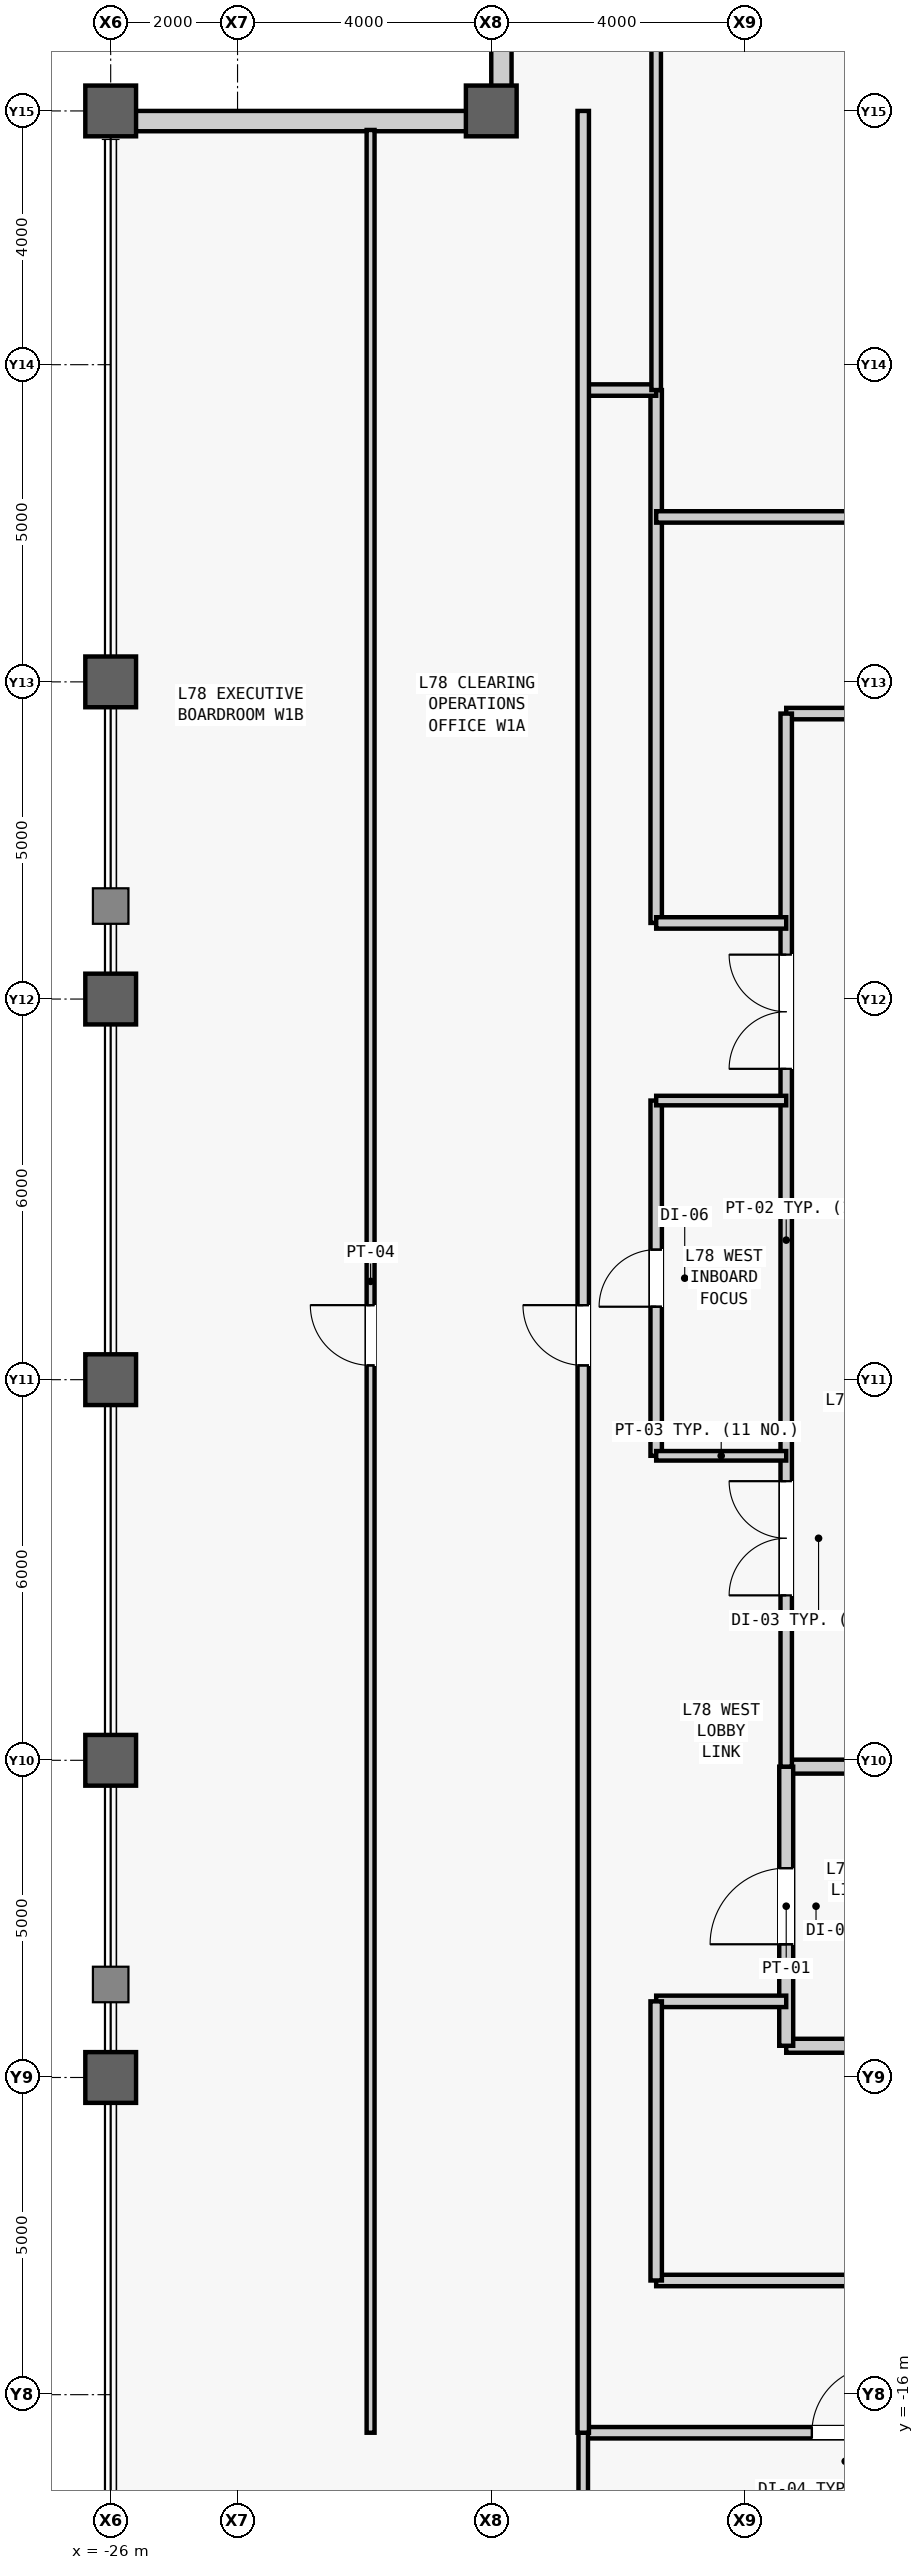
"""IFC4 building model, lengths in metres.
Left out: names, types, materials, properties, quantities, classifications, styles, units other than length and angle.
Written with IfcOpenShell. Run it as: python <this file> out.ifc"""

import sys

from ifc_helpers import new_model, si_unit, direction, frame, frame_2d, origin, origin_2d, place, context, subcontext, project, spatial, rectangle, hollow_rectangle, extrude, source, transform, mapped, element, fill, save


model = new_model("IFC4")
c1 = context("Model", 3, precision=1e-05, world=origin(), true_north=direction((0.0, 1.0)))
c2 = subcontext(c1, "Body", "Model", "MODEL_VIEW")
j1 = project(units=[si_unit("LENGTHUNIT", "METRE"), si_unit("PLANEANGLEUNIT", "RADIAN")], contexts=[c1])
p1 = place(None, origin())
s1 = spatial("IfcSite", under=j1, at=p1, CompositionType="ELEMENT")
p2 = place(p1, origin())
s2 = spatial("IfcBuilding", under=s1, at=p2, CompositionType="ELEMENT")
p3 = place(p2, frame((0.0, 0.0, 330.3)))
s3 = spatial("IfcBuildingStorey", under=s2, at=p3, CompositionType="ELEMENT", Elevation=330.3)
m1 = source(origin(), c2, "Body", "SweptSolid", [
    extrude(hollow_rectangle(XDim=0.8, YDim=0.8, WallThickness=0.045, at=origin_2d()), origin(), (0.0, 0.0, 1.0), 4.0),
])
for number, where, z_axis, x_axis in (
    (1, (-26.0, -11.0, 0.0), (0.0, 0.0, 1.0), (1.0, 0.0, 0.0)),
    (2, (-26.0, -6.0, 0.0), (0.0, 0.0, 1.0), (1.0, 0.0, 0.0)),
    (3, (-26.0, 0.0, 0.0), (0.0, 0.0, 1.0), (1.0, 0.0, 0.0)),
    (4, (-26.0, 6.0, 0.0), (0.0, 0.0, 1.0), (1.0, 0.0, 0.0)),
    (5, (-26.0, 11.0, 0.0), (0.0, 0.0, 1.0), (1.0, 0.0, 0.0)),
    (6, (-26.0, 20.0, 0.0), (0.0, 0.0, 1.0), (1.0, 0.0, 0.0)),
    (7, (-20.0, 20.0, 0.0), (0.0, 0.0, 1.0), (1.0, 0.0, 0.0)),
):
    element("IfcColumn", number, at=place(p3, frame(where, z_axis=z_axis, x_axis=x_axis)), inside=s3, PredefinedType="COLUMN", context=c2, shape_type="MappedRepresentation", body=[
        mapped(m1, transform((0.0, 0.0, 0.0), scale=1.0)),
    ])
m2 = source(origin(), c2, "Body", "SweptSolid", [
    extrude(rectangle(XDim=5.68, YDim=0.32, at=frame_2d((2.84, 0.0))), origin(), (0.0, 0.0, 1.0), 3.191),
])
p4 = place(p3, frame((-19.84, 20.0, 0.0), z_axis=(0.0, 0.0, 1.0), x_axis=(0.0, 1.0, 0.0)))
e8 = element("IfcWall", 8, at=p4, inside=s3, PredefinedType="STANDARD", context=c2, shape_type="MappedRepresentation", body=[
    mapped(m2, transform((0.0, 0.0, 0.0), scale=1.0)),
])
m3 = source(origin(), c2, "Body", "SweptSolid", [
    extrude(rectangle(XDim=1.8, YDim=2.4, at=frame_2d((0.9, 1.2))), frame((0.0, 0.17, 0.0), z_axis=(0.0, -1.0, 0.0), x_axis=(1.0, 0.0, 0.0)), (0.0, 0.0, 1.0), 0.34),
])
p5 = place(p4, frame((1.94, 0.0, 0.5)))
e9 = element("IfcOpeningElement", 9, at=p5, cuts=e8, PredefinedType="OPENING", context=c2, shape_type="MappedRepresentation", body=[
    mapped(m3, transform((0.0, 0.0, 0.0), scale=1.0)),
])
p6 = place(p3, frame((-20.0, 19.84, 0.0), z_axis=(0.0, 0.0, 1.0), x_axis=(-1.0, 0.0, 0.0)))
e10 = element("IfcWall", 10, at=p6, inside=s3, PredefinedType="STANDARD", context=c2, shape_type="MappedRepresentation", body=[
    mapped(m2, transform((0.0, 0.0, 0.0), scale=1.0)),
])
m4 = source(origin(), c2, "Body", "SweptSolid", [
    extrude(rectangle(XDim=4.05, YDim=0.22, at=frame_2d((2.025, 0.0))), origin(), (0.0, 0.0, 1.0), 3.74),
])
p7 = place(p3, frame((-15.35, -10.5, 0.0), z_axis=(0.0, 0.0, 1.0), x_axis=(1.0, 0.0, 0.0)))
e11 = element("IfcWall", 11, at=p7, inside=s3, PredefinedType="PARTITIONING", context=c2, shape_type="MappedRepresentation", body=[
    mapped(m4, transform((0.0, 0.0, 0.0), scale=1.0)),
])
m5 = source(origin(), c2, "Body", "SweptSolid", [
    extrude(rectangle(XDim=4.05, YDim=0.22, at=frame_2d((2.025, 0.0))), origin(), (0.0, 0.0, 1.0), 3.124),
])
p8 = place(p3, frame((-15.35, -6.1, 0.0), z_axis=(0.0, 0.0, 1.0), x_axis=(1.0, 0.0, 0.0)))
e12 = element("IfcWall", 12, at=p8, inside=s3, PredefinedType="PARTITIONING", context=c2, shape_type="MappedRepresentation", body=[
    mapped(m5, transform((0.0, 0.0, 0.0), scale=1.0)),
])
m6 = source(origin(), c2, "Body", "SweptSolid", [
    extrude(rectangle(XDim=4.4, YDim=0.22, at=frame_2d((2.2, 0.0))), origin(), (0.0, 0.0, 1.0), 3.74),
])
p9 = place(p3, frame((-15.35, -10.5, 0.0), z_axis=(0.0, 0.0, 1.0), x_axis=(0.0, 1.0, 0.0)))
e13 = element("IfcWall", 13, at=p9, inside=s3, PredefinedType="PARTITIONING", context=c2, shape_type="MappedRepresentation", body=[
    mapped(m6, transform((0.0, 0.0, 0.0), scale=1.0)),
])
m7 = source(origin(), c2, "Body", "SweptSolid", [
    extrude(rectangle(XDim=1.2, YDim=2.2, at=frame_2d((0.6, 1.1))), frame((0.0, 0.12, 0.0), z_axis=(0.0, -1.0, 0.0), x_axis=(1.0, 0.0, 0.0)), (0.0, 0.0, 1.0), 0.24),
])
p10 = place(p9, frame((1.6, 0.0, 0.0)))
e14 = element("IfcOpeningElement", 14, at=p10, cuts=e13, PredefinedType="OPENING", context=c2, shape_type="MappedRepresentation", body=[
    mapped(m7, transform((0.0, 0.0, 0.0), scale=1.0)),
])
m8 = source(origin(), c2, "Body", "SweptSolid", [
    extrude(rectangle(XDim=4.05, YDim=0.18, at=frame_2d((2.025, 0.0))), origin(), (0.0, 0.0, 1.0), 3.74),
])
p11 = place(p3, frame((-15.35, 10.5, 0.0), z_axis=(0.0, 0.0, 1.0), x_axis=(1.0, 0.0, 0.0)))
e15 = element("IfcWall", 15, at=p11, inside=s3, PredefinedType="PARTITIONING", context=c2, shape_type="MappedRepresentation", body=[
    mapped(m8, transform((0.0, 0.0, 0.0), scale=1.0)),
])
m9 = source(origin(), c2, "Body", "SweptSolid", [
    extrude(rectangle(XDim=16.6, YDim=0.18, at=frame_2d((8.3, 0.0))), origin(), (0.0, 0.0, 1.0), 3.74),
])
p12 = place(p3, frame((-15.35, -6.1, 0.0), z_axis=(0.0, 0.0, 1.0), x_axis=(0.0, 1.0, 0.0)))
e16 = element("IfcWall", 16, at=p12, inside=s3, PredefinedType="PARTITIONING", context=c2, shape_type="MappedRepresentation", body=[
    mapped(m9, transform((0.0, 0.0, 0.0), scale=1.0)),
])
m10 = source(origin(), c2, "Body", "SweptSolid", [
    extrude(rectangle(XDim=1.8, YDim=2.25, at=frame_2d((0.9, 1.125))), frame((0.0, 0.1, 0.0), z_axis=(0.0, -1.0, 0.0), x_axis=(1.0, 0.0, 0.0)), (0.0, 0.0, 1.0), 0.2),
])
p13 = place(p12, frame((2.7, 0.0, 0.0)))
e17 = element("IfcOpeningElement", 17, at=p13, cuts=e16, PredefinedType="OPENING", context=c2, shape_type="MappedRepresentation", body=[
    mapped(m10, transform((0.0, 0.0, 0.0), scale=1.0)),
])
p14 = place(p12, frame((11.0, 0.0, 0.0)))
e18 = element("IfcOpeningElement", 18, at=p14, cuts=e16, PredefinedType="OPENING", context=c2, shape_type="MappedRepresentation", body=[
    mapped(m10, transform((0.0, 0.0, 0.0), scale=1.0)),
])
m11 = source(origin(), c2, "Body", "SweptSolid", [
    extrude(rectangle(XDim=5.6, YDim=0.18, at=frame_2d((2.8, 0.0))), origin(), (0.0, 0.0, 1.0), 3.74),
])
p15 = place(p3, frame((-17.4, -1.2, 0.0), z_axis=(0.0, 0.0, 1.0), x_axis=(0.0, 1.0, 0.0)))
e19 = element("IfcWall", 19, at=p15, inside=s3, PredefinedType="PARTITIONING", context=c2, shape_type="MappedRepresentation", body=[
    mapped(m11, transform((0.0, 0.0, 0.0), scale=1.0)),
])
m12 = source(origin(), c2, "Body", "SweptSolid", [
    extrude(rectangle(XDim=0.9, YDim=2.15, at=frame_2d((0.45, 1.075))), frame((0.0, 0.1, 0.0), z_axis=(0.0, -1.0, 0.0), x_axis=(1.0, 0.0, 0.0)), (0.0, 0.0, 1.0), 0.2),
])
p16 = place(p15, frame((2.35, 0.0, 0.0)))
e20 = element("IfcOpeningElement", 20, at=p16, cuts=e19, PredefinedType="OPENING", context=c2, shape_type="MappedRepresentation", body=[
    mapped(m12, transform((0.0, 0.0, 0.0), scale=1.0)),
])
m13 = source(origin(), c2, "Body", "SweptSolid", [
    extrude(rectangle(XDim=2.05, YDim=0.15, at=frame_2d((1.025, 0.0))), origin(), (0.0, 0.0, 1.0), 3.74),
])
for number, where, z_axis, x_axis in (
    (21, (-17.4, -1.2, 0.0), (0.0, 0.0, 1.0), (1.0, 0.0, 0.0)),
    (22, (-17.4, 4.4, 0.0), (0.0, 0.0, 1.0), (1.0, 0.0, 0.0)),
):
    element("IfcWall", number, at=place(p3, frame(where, z_axis=z_axis, x_axis=x_axis)), inside=s3, PredefinedType="PARTITIONING", context=c2, shape_type="MappedRepresentation", body=[
        mapped(m13, transform((0.0, 0.0, 0.0), scale=1.0)),
    ])
m14 = source(origin(), c2, "Body", "SweptSolid", [
    extrude(rectangle(XDim=2.05, YDim=0.18, at=frame_2d((1.025, 0.0))), origin(), (0.0, 0.0, 1.0), 3.74),
])
p17 = place(p3, frame((-17.4, -9.8, 0.0), z_axis=(0.0, 0.0, 1.0), x_axis=(1.0, 0.0, 0.0)))
e23 = element("IfcWall", 23, at=p17, inside=s3, PredefinedType="PARTITIONING", context=c2, shape_type="MappedRepresentation", body=[
    mapped(m14, transform((0.0, 0.0, 0.0), scale=1.0)),
])
m15 = source(origin(), c2, "Body", "SweptSolid", [
    extrude(rectangle(XDim=8.4, YDim=0.18, at=frame_2d((4.2, 0.0))), origin(), (0.0, 0.0, 1.0), 3.74),
])
p18 = place(p3, frame((-17.4, 7.2, 0.0), z_axis=(0.0, 0.0, 1.0), x_axis=(0.0, 1.0, 0.0)))
e24 = element("IfcWall", 24, at=p18, inside=s3, PredefinedType="PARTITIONING", context=c2, shape_type="MappedRepresentation", body=[
    mapped(m15, transform((0.0, 0.0, 0.0), scale=1.0)),
])
p19 = place(p3, frame((-17.4, 7.2, 0.0), z_axis=(0.0, 0.0, 1.0), x_axis=(1.0, 0.0, 0.0)))
e25 = element("IfcWall", 25, at=p19, inside=s3, PredefinedType="PARTITIONING", context=c2, shape_type="MappedRepresentation", body=[
    mapped(m14, transform((0.0, 0.0, 0.0), scale=1.0)),
])
m16 = source(origin(), c2, "Body", "SweptSolid", [
    extrude(rectangle(XDim=16.1, YDim=0.18, at=frame_2d((8.05, 0.0))), origin(), (0.0, 0.0, 1.0), 3.74),
])
p20 = place(p3, frame((-17.4, -14.2, 0.0), z_axis=(0.0, 0.0, 1.0), x_axis=(1.0, 0.0, 0.0)))
e26 = element("IfcWall", 26, at=p20, inside=s3, PredefinedType="PARTITIONING", context=c2, shape_type="MappedRepresentation", body=[
    mapped(m16, transform((0.0, 0.0, 0.0), scale=1.0)),
])
p21 = place(p20, frame((8.95, 0.0, 0.0)))
e27 = element("IfcOpeningElement", 27, at=p21, cuts=e26, PredefinedType="OPENING", context=c2, shape_type="MappedRepresentation", body=[
    mapped(m12, transform((0.0, 0.0, 0.0), scale=1.0)),
])
m17 = source(origin(), c2, "Body", "SweptSolid", [
    extrude(rectangle(XDim=4.4, YDim=0.18, at=frame_2d((2.2, 0.0))), origin(), (0.0, 0.0, 1.0), 3.74),
])
p22 = place(p3, frame((-17.4, -14.2, 0.0), z_axis=(0.0, 0.0, 1.0), x_axis=(0.0, 1.0, 0.0)))
e28 = element("IfcWall", 28, at=p22, inside=s3, PredefinedType="PARTITIONING", context=c2, shape_type="MappedRepresentation", body=[
    mapped(m17, transform((0.0, 0.0, 0.0), scale=1.0)),
])
m18 = source(origin(), c2, "Body", "SweptSolid", [
    extrude(rectangle(XDim=1.15, YDim=0.18, at=frame_2d((0.575, 0.0))), origin(), (0.0, 0.0, 1.0), 3.74),
])
p23 = place(p3, frame((-18.55, 15.6, 0.0), z_axis=(0.0, 0.0, 1.0), x_axis=(1.0, 0.0, 0.0)))
e29 = element("IfcWall", 29, at=p23, inside=s3, PredefinedType="PARTITIONING", context=c2, shape_type="MappedRepresentation", body=[
    mapped(m18, transform((0.0, 0.0, 0.0), scale=1.0)),
])
m19 = source(origin(), c2, "Body", "SweptSolid", [
    extrude(rectangle(XDim=36.3, YDim=0.18, at=frame_2d((18.15, 0.0))), origin(), (0.0, 0.0, 1.0), 3.74),
])
p24 = place(p3, frame((-18.55, -16.6, 0.0), z_axis=(0.0, 0.0, 1.0), x_axis=(1.0, 0.0, 0.0)))
e30 = element("IfcWall", 30, at=p24, inside=s3, PredefinedType="PARTITIONING", context=c2, shape_type="MappedRepresentation", body=[
    mapped(m19, transform((0.0, 0.0, 0.0), scale=1.0)),
])
m20 = source(origin(), c2, "Body", "SweptSolid", [
    extrude(rectangle(XDim=1.05, YDim=2.2, at=frame_2d((0.525, 1.1))), frame((0.0, 0.1, 0.0), z_axis=(0.0, -1.0, 0.0), x_axis=(1.0, 0.0, 0.0)), (0.0, 0.0, 1.0), 0.2),
])
p25 = place(p24, frame((3.605, 0.0, 0.0)))
e31 = element("IfcOpeningElement", 31, at=p25, cuts=e30, PredefinedType="OPENING", context=c2, shape_type="MappedRepresentation", body=[
    mapped(m20, transform((0.0, 0.0, 0.0), scale=1.0)),
])
p26 = place(p24, frame((11.454, 0.0, 0.0)))
e32 = element("IfcOpeningElement", 32, at=p26, cuts=e30, PredefinedType="OPENING", context=c2, shape_type="MappedRepresentation", body=[
    mapped(m20, transform((0.0, 0.0, 0.0), scale=1.0)),
])
p27 = place(p24, frame((21.255, 0.0, 0.0)))
e33 = element("IfcOpeningElement", 33, at=p27, cuts=e30, PredefinedType="OPENING", context=c2, shape_type="MappedRepresentation", body=[
    mapped(m20, transform((0.0, 0.0, 0.0), scale=1.0)),
])
p28 = place(p24, frame((30.531, 0.0, 0.0)))
e34 = element("IfcOpeningElement", 34, at=p28, cuts=e30, PredefinedType="OPENING", context=c2, shape_type="MappedRepresentation", body=[
    mapped(m20, transform((0.0, 0.0, 0.0), scale=1.0)),
])
m21 = source(origin(), c2, "Body", "SweptSolid", [
    extrude(rectangle(XDim=9.4, YDim=0.15, at=frame_2d((4.7, 0.0))), origin(), (0.0, 0.0, 1.0), 3.74),
])
p29 = place(p3, frame((-18.55, -26.0, 0.0), z_axis=(0.0, 0.0, 1.0), x_axis=(0.0, 1.0, 0.0)))
e35 = element("IfcWall", 35, at=p29, inside=s3, PredefinedType="PARTITIONING", context=c2, shape_type="MappedRepresentation", body=[
    mapped(m21, transform((0.0, 0.0, 0.0), scale=1.0)),
])
m22 = source(origin(), c2, "Body", "SweptSolid", [
    extrude(rectangle(XDim=32.75, YDim=0.18, at=frame_2d((16.375, 0.0))), origin(), (0.0, 0.0, 1.0), 3.74),
])
p30 = place(p3, frame((-17.4, 13.6, 0.0), z_axis=(0.0, 0.0, 1.0), x_axis=(1.0, 0.0, 0.0)))
e36 = element("IfcWall", 36, at=p30, inside=s3, PredefinedType="PARTITIONING", context=c2, shape_type="MappedRepresentation", body=[
    mapped(m22, transform((0.0, 0.0, 0.0), scale=1.0)),
])
p31 = place(p30, frame((27.075, 0.0, 0.0)))
e37 = element("IfcOpeningElement", 37, at=p31, cuts=e36, PredefinedType="OPENING", context=c2, shape_type="MappedRepresentation", body=[
    mapped(m20, transform((0.0, 0.0, 0.0), scale=1.0)),
])
m23 = source(origin(), c2, "Body", "SweptSolid", [
    extrude(rectangle(XDim=10.4, YDim=0.15, at=frame_2d((5.2, 0.0))), origin(), (0.0, 0.0, 1.0), 3.74),
])
p32 = place(p3, frame((-17.4, 15.6, 0.0), z_axis=(0.0, 0.0, 1.0), x_axis=(0.0, 1.0, 0.0)))
e38 = element("IfcWall", 38, at=p32, inside=s3, PredefinedType="PARTITIONING", context=c2, shape_type="MappedRepresentation", body=[
    mapped(m23, transform((0.0, 0.0, 0.0), scale=1.0)),
])
m24 = source(origin(), c2, "Body", "SweptSolid", [
    extrude(rectangle(XDim=36.3, YDim=0.125, at=frame_2d((18.15, 0.0))), origin(), (0.0, 0.0, 1.0), 3.74),
])
p33 = place(p3, frame((-21.903, -16.6, 0.0), z_axis=(0.0, 0.0, 1.0), x_axis=(0.0, 1.0, 0.0)))
e39 = element("IfcWall", 39, at=p33, inside=s3, PredefinedType="PARTITIONING", context=c2, shape_type="MappedRepresentation", body=[
    mapped(m24, transform((0.0, 0.0, 0.0), scale=1.0)),
])
m25 = source(origin(), c2, "Body", "SweptSolid", [
    extrude(rectangle(XDim=0.95, YDim=2.15, at=frame_2d((0.475, 1.075))), frame((0.0, 0.073, 0.0), z_axis=(0.0, -1.0, 0.0), x_axis=(1.0, 0.0, 0.0)), (0.0, 0.0, 1.0), 0.145),
])
p34 = place(p33, frame((16.825, 0.0, 0.0)))
e40 = element("IfcOpeningElement", 40, at=p34, cuts=e39, PredefinedType="OPENING", context=c2, shape_type="MappedRepresentation", body=[
    mapped(m25, transform((0.0, 0.0, 0.0), scale=1.0)),
])
m26 = source(origin(), c2, "Body", "SweptSolid", [
    extrude(rectangle(XDim=36.6, YDim=0.18, at=frame_2d((18.3, 0.0))), origin(), (0.0, 0.0, 1.0), 3.74),
])
p35 = place(p3, frame((-18.55, -16.6, 0.0), z_axis=(0.0, 0.0, 1.0), x_axis=(0.0, 1.0, 0.0)))
e41 = element("IfcWall", 41, at=p35, inside=s3, PredefinedType="PARTITIONING", context=c2, shape_type="MappedRepresentation", body=[
    mapped(m26, transform((0.0, 0.0, 0.0), scale=1.0)),
])
m27 = source(origin(), c2, "Body", "SweptSolid", [
    extrude(rectangle(XDim=0.95, YDim=2.15, at=frame_2d((0.475, 1.075))), frame((0.0, 0.1, 0.0), z_axis=(0.0, -1.0, 0.0), x_axis=(1.0, 0.0, 0.0)), (0.0, 0.0, 1.0), 0.2),
])
p36 = place(p35, frame((16.825, 0.0, 0.0)))
e42 = element("IfcOpeningElement", 42, at=p36, cuts=e41, PredefinedType="OPENING", context=c2, shape_type="MappedRepresentation", body=[
    mapped(m27, transform((0.0, 0.0, 0.0), scale=1.0)),
])
m28 = source(origin(), c2, "Body", "SweptSolid", [
    extrude(rectangle(XDim=1.2, YDim=2.2, at=frame_2d((0.6, 1.1))), frame((0.0, 0.025, 0.0), z_axis=(0.0, -1.0, 0.0), x_axis=(1.0, 0.0, 0.0)), (0.0, 0.0, 1.0), 0.05),
])
p37 = place(p10, origin())
e43 = element("IfcDoor", 43, at=p37, inside=s3, OperationType="SINGLE_SWING_LEFT", PredefinedType="DOOR", context=c2, shape_type="MappedRepresentation", body=[
    mapped(m28, transform((0.0, 0.0, 0.0), scale=1.0)),
])
fill(e14, e43)
m29 = source(origin(), c2, "Body", "SweptSolid", [
    extrude(rectangle(XDim=1.8, YDim=2.25, at=frame_2d((0.9, 1.125))), frame((0.0, 0.025, 0.0), z_axis=(0.0, -1.0, 0.0), x_axis=(1.0, 0.0, 0.0)), (0.0, 0.0, 1.0), 0.05),
])
p38 = place(p13, origin())
e44 = element("IfcDoor", 44, at=p38, inside=s3, OperationType="SINGLE_SWING_LEFT", PredefinedType="DOOR", context=c2, shape_type="MappedRepresentation", body=[
    mapped(m29, transform((0.0, 0.0, 0.0), scale=1.0)),
])
fill(e17, e44)
p39 = place(p14, origin())
e45 = element("IfcDoor", 45, at=p39, inside=s3, OperationType="SINGLE_SWING_RIGHT", PredefinedType="DOOR", context=c2, shape_type="MappedRepresentation", body=[
    mapped(m29, transform((0.0, 0.0, 0.0), scale=1.0)),
])
fill(e18, e45)
m30 = source(origin(), c2, "Body", "SweptSolid", [
    extrude(rectangle(XDim=0.9, YDim=2.15, at=frame_2d((0.45, 1.075))), frame((0.0, 0.025, 0.0), z_axis=(0.0, -1.0, 0.0), x_axis=(1.0, 0.0, 0.0)), (0.0, 0.0, 1.0), 0.05),
])
p40 = place(p16, origin())
e46 = element("IfcDoor", 46, at=p40, inside=s3, OperationType="SINGLE_SWING_LEFT", PredefinedType="DOOR", context=c2, shape_type="MappedRepresentation", body=[
    mapped(m30, transform((0.0, 0.0, 0.0), scale=1.0)),
])
fill(e20, e46)
m31 = source(origin(), c2, "Body", "SweptSolid", [
    extrude(rectangle(XDim=1.05, YDim=2.2, at=frame_2d((0.525, 1.1))), frame((0.0, 0.025, 0.0), z_axis=(0.0, -1.0, 0.0), x_axis=(1.0, 0.0, 0.0)), (0.0, 0.0, 1.0), 0.05),
])
p41 = place(p25, origin())
e47 = element("IfcDoor", 47, at=p41, inside=s3, OperationType="SINGLE_SWING_RIGHT", PredefinedType="DOOR", context=c2, shape_type="MappedRepresentation", body=[
    mapped(m31, transform((0.0, 0.0, 0.0), scale=1.0)),
])
fill(e31, e47)
m32 = source(origin(), c2, "Body", "SweptSolid", [
    extrude(rectangle(XDim=0.95, YDim=2.15, at=frame_2d((0.475, 1.075))), frame((0.0, 0.025, 0.0), z_axis=(0.0, -1.0, 0.0), x_axis=(1.0, 0.0, 0.0)), (0.0, 0.0, 1.0), 0.05),
])
p42 = place(p34, origin())
e48 = element("IfcDoor", 48, at=p42, inside=s3, OperationType="SINGLE_SWING_RIGHT", PredefinedType="DOOR", context=c2, shape_type="MappedRepresentation", body=[
    mapped(m32, transform((0.0, 0.0, 0.0), scale=1.0)),
])
fill(e40, e48)
p43 = place(p36, origin())
e49 = element("IfcDoor", 49, at=p43, inside=s3, OperationType="SINGLE_SWING_RIGHT", PredefinedType="DOOR", context=c2, shape_type="MappedRepresentation", body=[
    mapped(m32, transform((0.0, 0.0, 0.0), scale=1.0)),
])
fill(e42, e49)
save(model, sys.argv[1])
